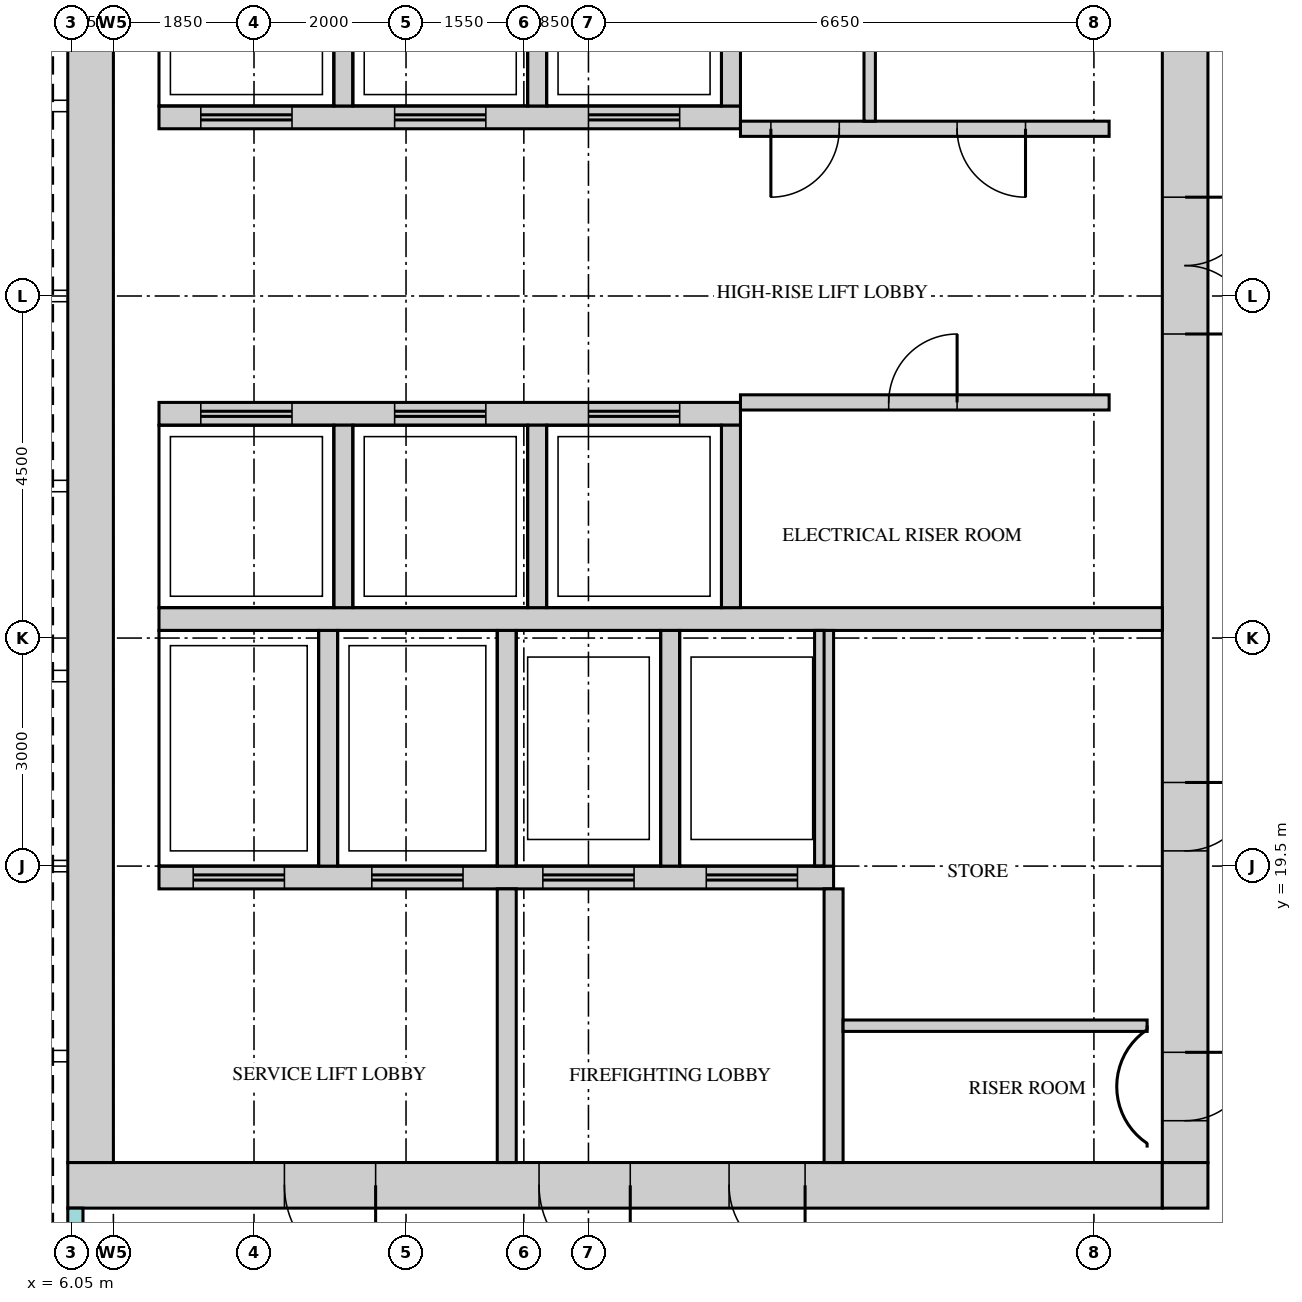
"""IFC4 building model, lengths in metres.
Left out: names, types, materials, properties, quantities, classifications, styles, units other than length and angle.
Written with IfcOpenShell. Run it as: python <this file> out.ifc"""

import sys

from ifc_helpers import new_model, si_unit, direction, frame, frame_2d, origin, place, context, subcontext, project, spatial, rectangle, extrude, source, transform, mapped, element, fill, save


model = new_model("IFC4")
c1 = context("Model", 3, precision=1e-05, world=origin(), true_north=direction((0.0, 1.0)))
c2 = subcontext(c1, "Body", "Model", "MODEL_VIEW")
j1 = project(units=[si_unit("LENGTHUNIT", "METRE"), si_unit("PLANEANGLEUNIT", "RADIAN")], contexts=[c1])
p1 = place(None, origin())
s1 = spatial("IfcSite", under=j1, at=p1, CompositionType="ELEMENT")
p2 = place(p1, origin())
s2 = spatial("IfcBuilding", under=s1, at=p2, CompositionType="ELEMENT")
p3 = place(p2, frame((0.0, 0.0, 294.2)))
s3 = spatial("IfcBuildingStorey", under=s2, at=p3, CompositionType="ELEMENT", Elevation=294.2)
m1 = source(origin(), c2, "Body", "SweptSolid", [
    extrude(rectangle(XDim=14.4, YDim=0.6, at=frame_2d((7.2, 0.0))), origin(), (0.0, 0.0, 1.0), 3.75),
])
p4 = place(p3, frame((6.0, 15.3, 0.0), z_axis=(0.0, 0.0, 1.0), x_axis=(1.0, 0.0, 0.0)))
e1 = element("IfcWall", 1, at=p4, inside=s3, PredefinedType="SHEAR", context=c2, shape_type="MappedRepresentation", body=[
    mapped(m1, transform((0.0, 0.0, 0.0))),
])
m2 = source(origin(), c2, "Body", "SweptSolid", [
    extrude(rectangle(XDim=1.2, YDim=2.1, at=frame_2d((0.6, 1.05))), frame((0.0, 0.31, 0.0), z_axis=(0.0, -1.0, 0.0), x_axis=(1.0, 0.0, 0.0)), (0.0, 0.0, 1.0), 0.62),
])
p5 = place(p4, frame((6.2, 0.0, 0.0)))
e2 = element("IfcOpeningElement", 2, at=p5, cuts=e1, PredefinedType="OPENING", context=c2, shape_type="MappedRepresentation", body=[
    mapped(m2, transform((0.0, 0.0, 0.0))),
])
p6 = place(p4, frame((2.85, 0.0, 0.0)))
e3 = element("IfcOpeningElement", 3, at=p6, cuts=e1, PredefinedType="OPENING", context=c2, shape_type="MappedRepresentation", body=[
    mapped(m2, transform((0.0, 0.0, 0.0))),
])
m3 = source(origin(), c2, "Body", "SweptSolid", [
    extrude(rectangle(XDim=1.0, YDim=2.1, at=frame_2d((0.5, 1.05))), frame((0.0, 0.31, 0.0), z_axis=(0.0, -1.0, 0.0), x_axis=(1.0, 0.0, 0.0)), (0.0, 0.0, 1.0), 0.62),
])
p7 = place(p4, frame((8.7, 0.0, 0.0)))
e4 = element("IfcOpeningElement", 4, at=p7, cuts=e1, PredefinedType="OPENING", context=c2, shape_type="MappedRepresentation", body=[
    mapped(m3, transform((0.0, 0.0, 0.0))),
])
m4 = source(origin(), c2, "Body", "SweptSolid", [
    extrude(rectangle(XDim=0.6, YDim=0.6, at=frame_2d((0.3, 0.0))), origin(), (0.0, 0.0, 1.0), 3.75),
])
p8 = place(p3, frame((20.4, 15.3, 0.0), z_axis=(0.0, 0.0, 1.0), x_axis=(1.0, 0.0, 0.0)))
e5 = element("IfcWall", 5, at=p8, inside=s3, PredefinedType="SHEAR", context=c2, shape_type="MappedRepresentation", body=[
    mapped(m4, transform((0.0, 0.0, 0.0))),
])
m5 = source(origin(), c2, "Body", "SweptSolid", [
    extrude(rectangle(XDim=22.8, YDim=0.6, at=frame_2d((11.4, 0.0))), origin(), (0.0, 0.0, 1.0), 3.75),
])
p9 = place(p3, frame((20.7, 15.6, 0.0), z_axis=(0.0, 0.0, 1.0), x_axis=(0.0, 1.0, 0.0)))
e6 = element("IfcWall", 6, at=p9, inside=s3, PredefinedType="SHEAR", context=c2, shape_type="MappedRepresentation", body=[
    mapped(m5, transform((0.0, 0.0, 0.0))),
])
m6 = source(origin(), c2, "Body", "SweptSolid", [
    extrude(rectangle(XDim=1.8, YDim=2.1, at=frame_2d((0.9, 1.05))), frame((0.0, 0.31, 0.0), z_axis=(0.0, -1.0, 0.0), x_axis=(1.0, 0.0, 0.0)), (0.0, 0.0, 1.0), 0.62),
])
p10 = place(p9, frame((10.9, 0.0, 0.0)))
e7 = element("IfcOpeningElement", 7, at=p10, cuts=e6, PredefinedType="OPENING", context=c2, shape_type="MappedRepresentation", body=[
    mapped(m6, transform((0.0, 0.0, 0.0))),
])
m7 = source(origin(), c2, "Body", "SweptSolid", [
    extrude(rectangle(XDim=0.9, YDim=2.1, at=frame_2d((0.45, 1.05))), frame((0.0, 0.31, 0.0), z_axis=(0.0, -1.0, 0.0), x_axis=(1.0, 0.0, 0.0)), (0.0, 0.0, 1.0), 0.62),
])
p11 = place(p9, frame((0.55, 0.0, 0.0)))
e8 = element("IfcOpeningElement", 8, at=p11, cuts=e6, PredefinedType="OPENING", context=c2, shape_type="MappedRepresentation", body=[
    mapped(m7, transform((0.0, 0.0, 0.0))),
])
p12 = place(p9, frame((4.1, 0.0, 0.0)))
e9 = element("IfcOpeningElement", 9, at=p12, cuts=e6, PredefinedType="OPENING", context=c2, shape_type="MappedRepresentation", body=[
    mapped(m7, transform((0.0, 0.0, 0.0))),
])
p13 = place(p3, frame((6.3, 15.6, 0.0), z_axis=(0.0, 0.0, 1.0), x_axis=(0.0, 1.0, 0.0)))
e10 = element("IfcWall", 10, at=p13, inside=s3, PredefinedType="SHEAR", context=c2, shape_type="MappedRepresentation", body=[
    mapped(m5, transform((0.0, 0.0, 0.0))),
])
m8 = source(origin(), c2, "Body", "SweptSolid", [
    extrude(rectangle(XDim=13.2, YDim=0.3, at=frame_2d((6.6, 0.0))), origin(), (0.0, 0.0, 1.0), 3.75),
])
p14 = place(p3, frame((7.2, 22.75, 0.0), z_axis=(0.0, 0.0, 1.0), x_axis=(1.0, 0.0, 0.0)))
e11 = element("IfcWall", 11, at=p14, inside=s3, PredefinedType="STANDARD", context=c2, shape_type="MappedRepresentation", body=[
    mapped(m8, transform((0.0, 0.0, 0.0))),
])
m9 = source(origin(), c2, "Body", "SweptSolid", [
    extrude(rectangle(XDim=8.875, YDim=0.3, at=frame_2d((4.438, 0.0))), origin(), (0.0, 0.0, 1.0), 3.75),
])
p15 = place(p3, frame((7.2, 19.35, 0.0), z_axis=(0.0, 0.0, 1.0), x_axis=(1.0, 0.0, 0.0)))
e12 = element("IfcWall", 12, at=p15, inside=s3, PredefinedType="STANDARD", context=c2, shape_type="MappedRepresentation", body=[
    mapped(m9, transform((0.0, 0.0, 0.0))),
])
m10 = source(origin(), c2, "Body", "SweptSolid", [
    extrude(rectangle(XDim=1.2, YDim=2.1, at=frame_2d((0.6, 1.05))), frame((0.0, 0.16, 0.0), z_axis=(0.0, -1.0, 0.0), x_axis=(1.0, 0.0, 0.0)), (0.0, 0.0, 1.0), 0.32),
])
p16 = place(p15, frame((0.45, 0.0, 0.0)))
e13 = element("IfcOpeningElement", 13, at=p16, cuts=e12, PredefinedType="OPENING", context=c2, shape_type="MappedRepresentation", body=[
    mapped(m10, transform((0.0, 0.0, 0.0))),
])
p17 = place(p15, frame((2.8, 0.0, 0.0)))
e14 = element("IfcOpeningElement", 14, at=p17, cuts=e12, PredefinedType="OPENING", context=c2, shape_type="MappedRepresentation", body=[
    mapped(m10, transform((0.0, 0.0, 0.0))),
])
p18 = place(p15, frame((5.05, 0.0, 0.0)))
e15 = element("IfcOpeningElement", 15, at=p18, cuts=e12, PredefinedType="OPENING", context=c2, shape_type="MappedRepresentation", body=[
    mapped(m10, transform((0.0, 0.0, 0.0))),
])
p19 = place(p15, frame((7.2, 0.0, 0.0)))
e16 = element("IfcOpeningElement", 16, at=p19, cuts=e12, PredefinedType="OPENING", context=c2, shape_type="MappedRepresentation", body=[
    mapped(m10, transform((0.0, 0.0, 0.0))),
])
m11 = source(origin(), c2, "Body", "SweptSolid", [
    extrude(rectangle(XDim=7.65, YDim=0.3, at=frame_2d((3.825, 0.0))), origin(), (0.0, 0.0, 1.0), 3.75),
])
p20 = place(p3, frame((7.2, 29.35, 0.0), z_axis=(0.0, 0.0, 1.0), x_axis=(1.0, 0.0, 0.0)))
e17 = element("IfcWall", 17, at=p20, inside=s3, PredefinedType="STANDARD", context=c2, shape_type="MappedRepresentation", body=[
    mapped(m11, transform((0.0, 0.0, 0.0))),
])
p21 = place(p20, frame((0.55, 0.0, 0.0)))
e18 = element("IfcOpeningElement", 18, at=p21, cuts=e17, PredefinedType="OPENING", context=c2, shape_type="MappedRepresentation", body=[
    mapped(m10, transform((0.0, 0.0, 0.0))),
])
p22 = place(p20, frame((3.1, 0.0, 0.0)))
e19 = element("IfcOpeningElement", 19, at=p22, cuts=e17, PredefinedType="OPENING", context=c2, shape_type="MappedRepresentation", body=[
    mapped(m10, transform((0.0, 0.0, 0.0))),
])
p23 = place(p20, frame((5.65, 0.0, 0.0)))
e20 = element("IfcOpeningElement", 20, at=p23, cuts=e17, PredefinedType="OPENING", context=c2, shape_type="MappedRepresentation", body=[
    mapped(m10, transform((0.0, 0.0, 0.0))),
])
p24 = place(p3, frame((7.2, 25.45, 0.0), z_axis=(0.0, 0.0, 1.0), x_axis=(1.0, 0.0, 0.0)))
e21 = element("IfcWall", 21, at=p24, inside=s3, PredefinedType="STANDARD", context=c2, shape_type="MappedRepresentation", body=[
    mapped(m11, transform((0.0, 0.0, 0.0))),
])
p25 = place(p24, frame((0.55, 0.0, 0.0)))
e22 = element("IfcOpeningElement", 22, at=p25, cuts=e21, PredefinedType="OPENING", context=c2, shape_type="MappedRepresentation", body=[
    mapped(m10, transform((0.0, 0.0, 0.0))),
])
p26 = place(p24, frame((3.1, 0.0, 0.0)))
e23 = element("IfcOpeningElement", 23, at=p26, cuts=e21, PredefinedType="OPENING", context=c2, shape_type="MappedRepresentation", body=[
    mapped(m10, transform((0.0, 0.0, 0.0))),
])
p27 = place(p24, frame((5.65, 0.0, 0.0)))
e24 = element("IfcOpeningElement", 24, at=p27, cuts=e21, PredefinedType="OPENING", context=c2, shape_type="MappedRepresentation", body=[
    mapped(m10, transform((0.0, 0.0, 0.0))),
])
m12 = source(origin(), c2, "Body", "SweptSolid", [
    extrude(rectangle(XDim=3.1, YDim=0.25, at=frame_2d((1.55, 0.0))), origin(), (0.0, 0.0, 1.0), 3.75),
])
for number, where, z_axis, x_axis in (
    (25, (9.425, 19.5, 0.0), (0.0, 0.0, 1.0), (0.0, 1.0, 0.0)),
    (26, (11.775, 19.5, 0.0), (0.0, 0.0, 1.0), (0.0, 1.0, 0.0)),
    (27, (13.925, 19.5, 0.0), (0.0, 0.0, 1.0), (0.0, 1.0, 0.0)),
    (28, (15.95, 19.5, 0.0), (0.0, 0.0, 1.0), (0.0, 1.0, 0.0)),
):
    element("IfcWall", number, at=place(p3, frame(where, z_axis=z_axis, x_axis=x_axis)), inside=s3, PredefinedType="STANDARD", context=c2, shape_type="MappedRepresentation", body=[
        mapped(m12, transform((0.0, 0.0, 0.0))),
    ])
m13 = source(origin(), c2, "Body", "SweptSolid", [
    extrude(rectangle(XDim=2.4, YDim=0.25, at=frame_2d((1.2, 0.0))), origin(), (0.0, 0.0, 1.0), 3.75),
])
for number, where, z_axis, x_axis in (
    (29, (9.625, 29.5, 0.0), (0.0, 0.0, 1.0), (0.0, 1.0, 0.0)),
    (30, (12.175, 29.5, 0.0), (0.0, 0.0, 1.0), (0.0, 1.0, 0.0)),
    (31, (14.725, 29.5, 0.0), (0.0, 0.0, 1.0), (0.0, 1.0, 0.0)),
):
    element("IfcWall", number, at=place(p3, frame(where, z_axis=z_axis, x_axis=x_axis)), inside=s3, PredefinedType="STANDARD", context=c2, shape_type="MappedRepresentation", body=[
        mapped(m13, transform((0.0, 0.0, 0.0))),
    ])
m14 = source(origin(), c2, "Body", "SweptSolid", [
    extrude(rectangle(XDim=2.4, YDim=0.25, at=frame_2d((1.2, 0.0))), origin(), (0.0, 0.0, 1.0), 3.75),
])
for number, where, z_axis, x_axis in (
    (32, (9.625, 22.9, 0.0), (0.0, 0.0, 1.0), (0.0, 1.0, 0.0)),
    (33, (12.175, 22.9, 0.0), (0.0, 0.0, 1.0), (0.0, 1.0, 0.0)),
    (34, (14.725, 22.9, 0.0), (0.0, 0.0, 1.0), (0.0, 1.0, 0.0)),
):
    element("IfcWall", number, at=place(p3, frame(where, z_axis=z_axis, x_axis=x_axis)), inside=s3, PredefinedType="STANDARD", context=c2, shape_type="MappedRepresentation", body=[
        mapped(m14, transform((0.0, 0.0, 0.0))),
    ])
m15 = source(origin(), c2, "Body", "SweptSolid", [
    extrude(rectangle(XDim=3.6, YDim=0.25, at=frame_2d((1.8, 0.0))), origin(), (0.0, 0.0, 1.0), 3.75),
])
for number, where, z_axis, x_axis in (
    (35, (16.075, 15.6, 0.0), (0.0, 0.0, 1.0), (0.0, 1.0, 0.0)),
    (36, (11.775, 15.6, 0.0), (0.0, 0.0, 1.0), (0.0, 1.0, 0.0)),
):
    element("IfcWall", number, at=place(p3, frame(where, z_axis=z_axis, x_axis=x_axis)), inside=s3, PredefinedType="STANDARD", context=c2, shape_type="MappedRepresentation", body=[
        mapped(m15, transform((0.0, 0.0, 0.0))),
    ])
m16 = source(origin(), c2, "Body", "SweptSolid", [
    extrude(rectangle(XDim=4.0, YDim=0.15, at=frame_2d((2.0, 0.0))), origin(), (0.0, 0.0, 1.0), 3.8),
])
p28 = place(p3, frame((16.2, 17.4, 0.0), z_axis=(0.0, 0.0, 1.0), x_axis=(1.0, 0.0, 0.0)))
e37 = element("IfcWall", 37, at=p28, inside=s3, PredefinedType="PARTITIONING", context=c2, shape_type="MappedRepresentation", body=[
    mapped(m16, transform((0.0, 0.0, 0.0))),
])
m17 = source(origin(), c2, "Body", "SweptSolid", [
    extrude(rectangle(XDim=4.85, YDim=0.2, at=frame_2d((2.425, 0.0))), origin(), (0.0, 0.0, 1.0), 3.8),
])
p29 = place(p3, frame((14.85, 25.6, 0.0), z_axis=(0.0, 0.0, 1.0), x_axis=(1.0, 0.0, 0.0)))
e38 = element("IfcWall", 38, at=p29, inside=s3, PredefinedType="PARTITIONING", context=c2, shape_type="MappedRepresentation", body=[
    mapped(m17, transform((0.0, 0.0, 0.0))),
])
m18 = source(origin(), c2, "Body", "SweptSolid", [
    extrude(rectangle(XDim=0.9, YDim=2.1, at=frame_2d((0.45, 1.05))), frame((0.0, 0.11, 0.0), z_axis=(0.0, -1.0, 0.0), x_axis=(1.0, 0.0, 0.0)), (0.0, 0.0, 1.0), 0.22),
])
p30 = place(p29, frame((1.95, 0.0, 0.0)))
e39 = element("IfcOpeningElement", 39, at=p30, cuts=e38, PredefinedType="OPENING", context=c2, shape_type="MappedRepresentation", body=[
    mapped(m18, transform((0.0, 0.0, 0.0))),
])
p31 = place(p3, frame((14.85, 29.2, 0.0), z_axis=(0.0, 0.0, 1.0), x_axis=(1.0, 0.0, 0.0)))
e40 = element("IfcWall", 40, at=p31, inside=s3, PredefinedType="PARTITIONING", context=c2, shape_type="MappedRepresentation", body=[
    mapped(m17, transform((0.0, 0.0, 0.0))),
])
p32 = place(p31, frame((0.4, 0.0, 0.0)))
e41 = element("IfcOpeningElement", 41, at=p32, cuts=e40, PredefinedType="OPENING", context=c2, shape_type="MappedRepresentation", body=[
    mapped(m18, transform((0.0, 0.0, 0.0))),
])
p33 = place(p31, frame((2.85, 0.0, 0.0)))
e42 = element("IfcOpeningElement", 42, at=p33, cuts=e40, PredefinedType="OPENING", context=c2, shape_type="MappedRepresentation", body=[
    mapped(m18, transform((0.0, 0.0, 0.0))),
])
m19 = source(origin(), c2, "Body", "SweptSolid", [
    extrude(rectangle(XDim=2.8, YDim=0.15, at=frame_2d((1.4, 0.0))), origin(), (0.0, 0.0, 1.0), 3.8),
])
p34 = place(p3, frame((16.55, 29.3, 0.0), z_axis=(0.0, 0.0, 1.0), x_axis=(0.0, 1.0, 0.0)))
e43 = element("IfcWall", 43, at=p34, inside=s3, PredefinedType="PARTITIONING", context=c2, shape_type="MappedRepresentation", body=[
    mapped(m19, transform((0.0, 0.0, 0.0))),
])
m20 = source(origin(), c2, "Body", "SweptSolid", [
    extrude(rectangle(XDim=0.9, YDim=2.1, at=frame_2d((0.45, 1.05))), frame((0.0, 0.025, 0.0), z_axis=(0.0, -1.0, 0.0), x_axis=(1.0, 0.0, 0.0)), (0.0, 0.0, 1.0), 0.05),
])
p35 = place(p30, origin())
e44 = element("IfcDoor", 44, at=p35, inside=s3, OperationType="SINGLE_SWING_LEFT", PredefinedType="DOOR", context=c2, shape_type="MappedRepresentation", body=[
    mapped(m20, transform((0.0, 0.0, 0.0))),
])
fill(e39, e44)
p36 = place(p32, origin())
e45 = element("IfcDoor", 45, at=p36, inside=s3, OperationType="SINGLE_SWING_LEFT", PredefinedType="DOOR", context=c2, shape_type="MappedRepresentation", body=[
    mapped(m20, transform((0.0, 0.0, 0.0))),
])
fill(e41, e45)
p37 = place(p33, origin())
e46 = element("IfcDoor", 46, at=p37, inside=s3, OperationType="SINGLE_SWING_RIGHT", PredefinedType="DOOR", context=c2, shape_type="MappedRepresentation", body=[
    mapped(m20, transform((0.0, 0.0, 0.0))),
])
fill(e42, e46)
m21 = source(origin(), c2, "Body", "SweptSolid", [
    extrude(rectangle(XDim=1.8, YDim=2.1, at=frame_2d((0.9, 1.05))), frame((0.0, 0.25, 0.0), z_axis=(0.0, -1.0, 0.0), x_axis=(1.0, 0.0, 0.0)), (0.0, 0.0, 1.0), 0.5),
])
p38 = place(p10, origin())
e47 = element("IfcDoor", 47, at=p38, inside=s3, OperationType="DOUBLE_DOOR_SINGLE_SWING", PredefinedType="DOOR", context=c2, shape_type="MappedRepresentation", body=[
    mapped(m21, transform((0.0, 0.0, 0.0))),
])
fill(e7, e47)
m22 = source(origin(), c2, "Body", "SweptSolid", [
    extrude(rectangle(XDim=0.9, YDim=2.1, at=frame_2d((0.45, 1.05))), frame((0.0, 0.25, 0.0), z_axis=(0.0, -1.0, 0.0), x_axis=(1.0, 0.0, 0.0)), (0.0, 0.0, 1.0), 0.5),
])
p39 = place(p11, origin())
e48 = element("IfcDoor", 48, at=p39, inside=s3, OperationType="SINGLE_SWING_RIGHT", PredefinedType="DOOR", context=c2, shape_type="MappedRepresentation", body=[
    mapped(m22, transform((0.0, 0.0, 0.0))),
])
fill(e8, e48)
p40 = place(p12, origin())
e49 = element("IfcDoor", 49, at=p40, inside=s3, OperationType="SINGLE_SWING_RIGHT", PredefinedType="DOOR", context=c2, shape_type="MappedRepresentation", body=[
    mapped(m22, transform((0.0, 0.0, 0.0))),
])
fill(e9, e49)
m23 = source(origin(), c2, "Body", "SweptSolid", [
    extrude(rectangle(XDim=1.2, YDim=2.1, at=frame_2d((0.6, 1.05))), frame((0.0, 0.25, 0.0), z_axis=(0.0, -1.0, 0.0), x_axis=(1.0, 0.0, 0.0)), (0.0, 0.0, 1.0), 0.5),
])
p41 = place(p5, origin())
e50 = element("IfcDoor", 50, at=p41, inside=s3, OperationType="SINGLE_SWING_RIGHT", PredefinedType="DOOR", context=c2, shape_type="MappedRepresentation", body=[
    mapped(m23, transform((0.0, 0.0, 0.0))),
])
fill(e2, e50)
p42 = place(p6, origin())
e51 = element("IfcDoor", 51, at=p42, inside=s3, OperationType="SINGLE_SWING_RIGHT", PredefinedType="DOOR", context=c2, shape_type="MappedRepresentation", body=[
    mapped(m23, transform((0.0, 0.0, 0.0))),
])
fill(e3, e51)
m24 = source(origin(), c2, "Body", "SweptSolid", [
    extrude(rectangle(XDim=1.0, YDim=2.1, at=frame_2d((0.5, 1.05))), frame((0.0, 0.25, 0.0), z_axis=(0.0, -1.0, 0.0), x_axis=(1.0, 0.0, 0.0)), (0.0, 0.0, 1.0), 0.5),
])
p43 = place(p7, origin())
e52 = element("IfcDoor", 52, at=p43, inside=s3, OperationType="SINGLE_SWING_RIGHT", PredefinedType="DOOR", context=c2, shape_type="MappedRepresentation", body=[
    mapped(m24, transform((0.0, 0.0, 0.0))),
])
fill(e4, e52)
m25 = source(origin(), c2, "Body", "SweptSolid", [
    extrude(rectangle(XDim=1.2, YDim=2.1, at=frame_2d((0.6, 1.05))), frame((0.0, 0.025, 0.0), z_axis=(0.0, -1.0, 0.0), x_axis=(1.0, 0.0, 0.0)), (0.0, 0.0, 1.0), 0.05),
])
p44 = place(p25, origin())
e53 = element("IfcDoor", 53, at=p44, inside=s3, OperationType="DOUBLE_DOOR_SLIDING", PredefinedType="DOOR", context=c2, shape_type="MappedRepresentation", body=[
    mapped(m25, transform((0.0, 0.0, 0.0))),
])
fill(e22, e53)
p45 = place(p26, origin())
e54 = element("IfcDoor", 54, at=p45, inside=s3, OperationType="DOUBLE_DOOR_SLIDING", PredefinedType="DOOR", context=c2, shape_type="MappedRepresentation", body=[
    mapped(m25, transform((0.0, 0.0, 0.0))),
])
fill(e23, e54)
p46 = place(p27, origin())
e55 = element("IfcDoor", 55, at=p46, inside=s3, OperationType="DOUBLE_DOOR_SLIDING", PredefinedType="DOOR", context=c2, shape_type="MappedRepresentation", body=[
    mapped(m25, transform((0.0, 0.0, 0.0))),
])
fill(e24, e55)
p47 = place(p21, origin())
e56 = element("IfcDoor", 56, at=p47, inside=s3, OperationType="DOUBLE_DOOR_SLIDING", PredefinedType="DOOR", context=c2, shape_type="MappedRepresentation", body=[
    mapped(m25, transform((0.0, 0.0, 0.0))),
])
fill(e18, e56)
p48 = place(p22, origin())
e57 = element("IfcDoor", 57, at=p48, inside=s3, OperationType="DOUBLE_DOOR_SLIDING", PredefinedType="DOOR", context=c2, shape_type="MappedRepresentation", body=[
    mapped(m25, transform((0.0, 0.0, 0.0))),
])
fill(e19, e57)
p49 = place(p23, origin())
e58 = element("IfcDoor", 58, at=p49, inside=s3, OperationType="DOUBLE_DOOR_SLIDING", PredefinedType="DOOR", context=c2, shape_type="MappedRepresentation", body=[
    mapped(m25, transform((0.0, 0.0, 0.0))),
])
fill(e20, e58)
p50 = place(p16, origin())
e59 = element("IfcDoor", 59, at=p50, inside=s3, OperationType="DOUBLE_DOOR_SLIDING", PredefinedType="DOOR", context=c2, shape_type="MappedRepresentation", body=[
    mapped(m25, transform((0.0, 0.0, 0.0))),
])
fill(e13, e59)
p51 = place(p17, origin())
e60 = element("IfcDoor", 60, at=p51, inside=s3, OperationType="DOUBLE_DOOR_SLIDING", PredefinedType="DOOR", context=c2, shape_type="MappedRepresentation", body=[
    mapped(m25, transform((0.0, 0.0, 0.0))),
])
fill(e14, e60)
p52 = place(p18, origin())
e61 = element("IfcDoor", 61, at=p52, inside=s3, OperationType="DOUBLE_DOOR_SLIDING", PredefinedType="DOOR", context=c2, shape_type="MappedRepresentation", body=[
    mapped(m25, transform((0.0, 0.0, 0.0))),
])
fill(e15, e61)
p53 = place(p19, origin())
e62 = element("IfcDoor", 62, at=p53, inside=s3, OperationType="DOUBLE_DOOR_SLIDING", PredefinedType="DOOR", context=c2, shape_type="MappedRepresentation", body=[
    mapped(m25, transform((0.0, 0.0, 0.0))),
])
fill(e16, e62)
save(model, sys.argv[1])
